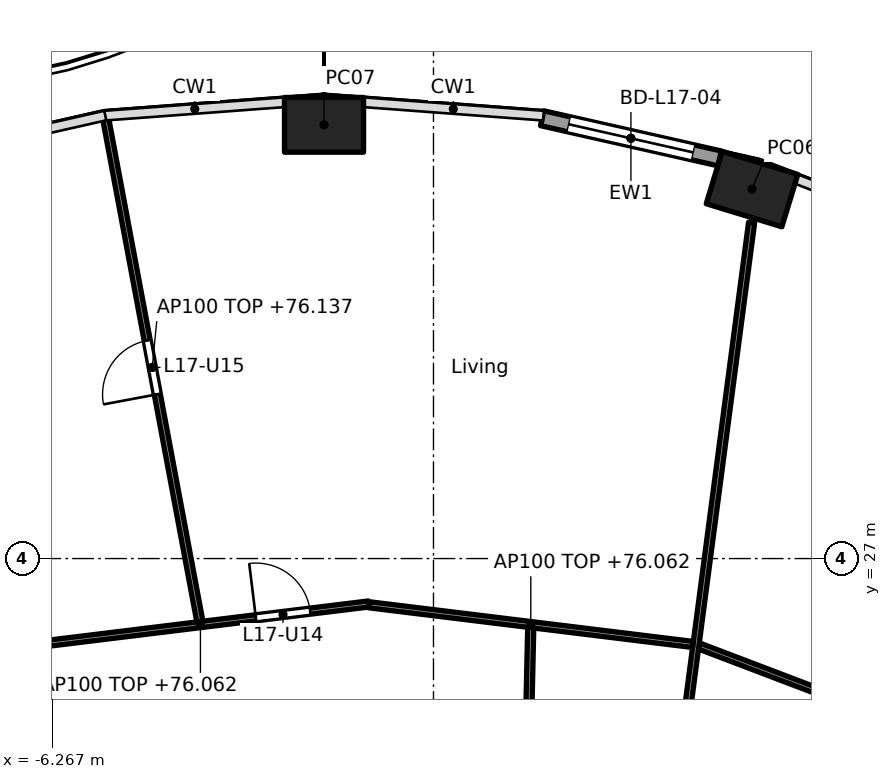
"""IFC4 building model, lengths in metres.
Left out: names, types, materials, properties, quantities, classifications, styles, units other than length and angle.
Written with IfcOpenShell. Run it as: python <this file> out.ifc"""

import sys

from ifc_helpers import new_model, si_unit, direction, frame, frame_2d, origin, origin_2d, place, context, subcontext, project, spatial, rectangle, hollow_rectangle, extrude, element, fill, save


model = new_model("IFC4")
c1 = context("Model", 3, precision=1e-05, world=origin(), true_north=direction((0.0, 1.0)))
c2 = subcontext(c1, "Body", "Model", "MODEL_VIEW")
j1 = project(units=[si_unit("LENGTHUNIT", "METRE"), si_unit("PLANEANGLEUNIT", "RADIAN")], contexts=[c1])
p1 = place(None, origin())
s1 = spatial("IfcSite", under=j1, at=p1, CompositionType="ELEMENT")
p2 = place(p1, origin())
s2 = spatial("IfcBuilding", under=s1, at=p2, CompositionType="ELEMENT")
p3 = place(p2, frame((0.0, 0.0, 73.3)))
s3 = spatial("IfcBuildingStorey", under=s2, at=p3, CompositionType="ELEMENT", Elevation=73.3)
for number, where, z_axis, x_axis in (
    (1, (5.239, 33.076, -0.26), (0.0, 0.0, 1.0), (-0.957, 0.292, 0.0)),
    (2, (-1.8, 34.133, -0.26), (0.0, 0.0, 1.0), (-1.0, 0.0, 0.0)),
):
    element("IfcColumn", number, at=place(p3, frame(where, z_axis=z_axis, x_axis=x_axis)), inside=s3, PredefinedType="COLUMN", context=c2, shape_type="SweptSolid", body=[
        extrude(hollow_rectangle(XDim=1.3, YDim=0.9, WallThickness=0.045, at=origin_2d()), origin(), (0.0, 0.0, 1.0), 3.96),
    ])
p4 = place(p3, frame((1.787, 34.241, 0.0), z_axis=(0.0, 0.0, 1.0), x_axis=(0.975317607872, -0.220806620767, 0.0)))
e3 = element("IfcWall", 3, at=p4, inside=s3, PredefinedType="SOLIDWALL", context=c2, shape_type="SweptSolid", body=[
    extrude(rectangle(XDim=2.993, YDim=0.25, at=frame_2d((1.497, 0.0))), origin(), (0.0, 0.0, 1.0), 3.44),
])
p5 = place(p4, frame((0.447, 0.0, 0.0)))
e4 = element("IfcOpeningElement", 4, at=p5, cuts=e3, PredefinedType="OPENING", context=c2, shape_type="SweptSolid", body=[
    extrude(rectangle(XDim=2.1, YDim=2.4, at=frame_2d((1.05, 1.2))), frame((0.0, 0.135, 0.0), z_axis=(0.0, -1.0, 0.0), x_axis=(1.0, 0.0, 0.0)), (0.0, 0.0, 1.0), 0.27),
])
p6 = place(p3, frame((6.141, 14.829, 0.0), z_axis=(0.0, 0.0, 1.0), x_axis=(0.354477134193, 0.935064682968, 0.0)))
e5 = element("IfcWall", 5, at=p6, inside=s3, PredefinedType="PARTITIONING", context=c2, shape_type="SweptSolid", body=[
    extrude(rectangle(XDim=15.626, YDim=0.1, at=frame_2d((7.813, 0.0))), origin(), (0.0, 0.0, 1.0), 2.762),
])
p7 = place(p6, frame((1.35, 0.0, 0.0)))
e6 = element("IfcOpeningElement", 6, at=p7, cuts=e5, PredefinedType="OPENING", context=c2, shape_type="SweptSolid", body=[
    extrude(rectangle(XDim=0.9, YDim=2.1, at=frame_2d((0.45, 1.05))), frame((0.0, 0.06, 0.0), z_axis=(0.0, -1.0, 0.0), x_axis=(1.0, 0.0, 0.0)), (0.0, 0.0, 1.0), 0.12),
])
p8 = place(p6, frame((5.606, 0.0, 0.0)))
e7 = element("IfcOpeningElement", 7, at=p8, cuts=e5, PredefinedType="OPENING", context=c2, shape_type="SweptSolid", body=[
    extrude(rectangle(XDim=0.9, YDim=2.1, at=frame_2d((0.45, 1.05))), frame((0.0, 0.06, 0.0), z_axis=(0.0, -1.0, 0.0), x_axis=(1.0, 0.0, 0.0)), (0.0, 0.0, 1.0), 0.12),
])
p9 = place(p3, frame((9.426, 23.637, 0.0), z_axis=(0.0, 0.0, 1.0), x_axis=(-0.93461405629, 0.355663557011, 0.0)))
e8 = element("IfcWall", 8, at=p9, inside=s3, PredefinedType="PARTITIONING", context=c2, shape_type="SweptSolid", body=[
    extrude(rectangle(XDim=5.417, YDim=0.1, at=frame_2d((2.708, 0.0))), origin(), (0.0, 0.0, 1.0), 2.762),
])
p10 = place(p9, frame((2.258, 0.0, 0.0)))
e9 = element("IfcOpeningElement", 9, at=p10, cuts=e8, PredefinedType="OPENING", context=c2, shape_type="SweptSolid", body=[
    extrude(rectangle(XDim=0.9, YDim=2.1, at=frame_2d((0.45, 1.05))), frame((0.0, 0.06, 0.0), z_axis=(0.0, -1.0, 0.0), x_axis=(1.0, 0.0, 0.0)), (0.0, 0.0, 1.0), 0.12),
])
p11 = place(p3, frame((2.615, 12.664, 0.0), z_axis=(0.0, 0.0, 1.0), x_axis=(0.130614967904, 0.99143316979, 0.0)))
e10 = element("IfcWall", 10, at=p11, inside=s3, PredefinedType="PARTITIONING", context=c2, shape_type="SweptSolid", body=[
    extrude(rectangle(XDim=20.034, YDim=0.1, at=frame_2d((10.017, 0.0))), origin(), (0.0, 0.0, 1.0), 2.687),
])
p12 = place(p11, frame((2.359, 0.0, 0.0)))
e11 = element("IfcOpeningElement", 11, at=p12, cuts=e10, PredefinedType="OPENING", context=c2, shape_type="SweptSolid", body=[
    extrude(rectangle(XDim=0.9, YDim=2.1, at=frame_2d((0.45, 1.05))), frame((0.0, 0.06, 0.0), z_axis=(0.0, -1.0, 0.0), x_axis=(1.0, 0.0, 0.0)), (0.0, 0.0, 1.0), 0.12),
])
p13 = place(p11, frame((8.873, 0.0, 0.0)))
e12 = element("IfcOpeningElement", 12, at=p13, cuts=e10, PredefinedType="OPENING", context=c2, shape_type="SweptSolid", body=[
    extrude(rectangle(XDim=0.9, YDim=2.1, at=frame_2d((0.45, 1.05))), frame((0.0, 0.06, 0.0), z_axis=(0.0, -1.0, 0.0), x_axis=(1.0, 0.0, 0.0)), (0.0, 0.0, 1.0), 0.12),
])
p14 = place(p3, frame((4.267, 25.587, 0.0), z_axis=(0.0, 0.0, 1.0), x_axis=(-0.992576206119, 0.121624319302, 0.0)))
e13 = element("IfcWall", 13, at=p14, inside=s3, PredefinedType="PARTITIONING", context=c2, shape_type="SweptSolid", body=[
    extrude(rectangle(XDim=5.374, YDim=0.1, at=frame_2d((2.687, 0.0))), origin(), (0.0, 0.0, 1.0), 2.762),
])
p15 = place(p3, frame((1.433, 18.428, 0.0), z_axis=(0.0, 0.0, 1.0), x_axis=(0.022419421812, 0.999748653175, 0.0)))
e14 = element("IfcWall", 14, at=p15, inside=s3, PredefinedType="PARTITIONING", context=c2, shape_type="SweptSolid", body=[
    extrude(rectangle(XDim=7.438, YDim=0.1, at=frame_2d((3.719, 0.0))), origin(), (0.0, 0.0, 1.0), 3.44),
])
p16 = place(p3, frame((-1.066, 26.253, 0.0), z_axis=(0.0, 0.0, 1.0), x_axis=(-0.992574197255, -0.121640712523, 0.0)))
e15 = element("IfcWall", 15, at=p16, inside=s3, PredefinedType="PARTITIONING", context=c2, shape_type="SweptSolid", body=[
    extrude(rectangle(XDim=5.574, YDim=0.1, at=frame_2d((2.787, 0.0))), origin(), (0.0, 0.0, 1.0), 2.762),
])
p17 = place(p16, frame((0.969, 0.0, 0.0)))
e16 = element("IfcOpeningElement", 16, at=p17, cuts=e15, PredefinedType="OPENING", context=c2, shape_type="SweptSolid", body=[
    extrude(rectangle(XDim=0.9, YDim=2.1, at=frame_2d((0.45, 1.05))), frame((0.0, 0.06, 0.0), z_axis=(0.0, -1.0, 0.0), x_axis=(1.0, 0.0, 0.0)), (0.0, 0.0, 1.0), 0.12),
])
p18 = place(p3, frame((-3.842, 25.963, 0.0), z_axis=(0.0, 0.0, 1.0), x_axis=(-0.184068442651, 0.982913428752, 0.0)))
e17 = element("IfcWall", 17, at=p18, inside=s3, PredefinedType="PARTITIONING", context=c2, shape_type="SweptSolid", body=[
    extrude(rectangle(XDim=8.506, YDim=0.1, at=frame_2d((4.253, 0.0))), origin(), (0.0, 0.0, 1.0), 2.837),
])
p19 = place(p18, frame((3.803, 0.0, 0.0)))
e18 = element("IfcOpeningElement", 18, at=p19, cuts=e17, PredefinedType="OPENING", context=c2, shape_type="SweptSolid", body=[
    extrude(rectangle(XDim=0.9, YDim=2.1, at=frame_2d((0.45, 1.05))), frame((0.0, 0.06, 0.0), z_axis=(0.0, -1.0, 0.0), x_axis=(1.0, 0.0, 0.0)), (0.0, 0.0, 1.0), 0.12),
])
p20 = place(p3, frame((-6.072, 17.915, 0.0), z_axis=(0.0, 0.0, 1.0), x_axis=(-0.404139814253, 0.914697223422, 0.0)))
e19 = element("IfcWall", 19, at=p20, inside=s3, PredefinedType="PARTITIONING", context=c2, shape_type="SweptSolid", body=[
    extrude(rectangle(XDim=15.614, YDim=0.1, at=frame_2d((7.807, 0.0))), origin(), (0.0, 0.0, 1.0), 2.837),
])
p21 = place(p20, frame((3.226, 0.0, 0.0)))
e20 = element("IfcOpeningElement", 20, at=p21, cuts=e19, PredefinedType="OPENING", context=c2, shape_type="SweptSolid", body=[
    extrude(rectangle(XDim=0.9, YDim=2.1, at=frame_2d((0.45, 1.05))), frame((0.0, 0.06, 0.0), z_axis=(0.0, -1.0, 0.0), x_axis=(1.0, 0.0, 0.0)), (0.0, 0.0, 1.0), 0.12),
])
p22 = place(p5, origin())
e21 = element("IfcDoor", 21, at=p22, inside=s3, OperationType="SLIDING_TO_LEFT", PredefinedType="DOOR", context=c2, shape_type="SweptSolid", body=[
    extrude(rectangle(XDim=2.1, YDim=2.4, at=frame_2d((1.05, 1.2))), frame((0.0, 0.025, 0.0), z_axis=(0.0, -1.0, 0.0), x_axis=(1.0, 0.0, 0.0)), (0.0, 0.0, 1.0), 0.05),
])
fill(e4, e21)
p23 = place(p17, frame((0.9, 0.0, 0.0), x_axis=(-1.0, 0.0, 0.0)))
e22 = element("IfcDoor", 22, at=p23, inside=s3, OperationType="SINGLE_SWING_LEFT", PredefinedType="DOOR", context=c2, shape_type="SweptSolid", body=[
    extrude(rectangle(XDim=0.9, YDim=2.1, at=frame_2d((0.45, 1.05))), frame((0.0, 0.025, 0.0), z_axis=(0.0, -1.0, 0.0), x_axis=(1.0, 0.0, 0.0)), (0.0, 0.0, 1.0), 0.05),
])
fill(e16, e22)
p24 = place(p19, origin())
e23 = element("IfcDoor", 23, at=p24, inside=s3, OperationType="SINGLE_SWING_LEFT", PredefinedType="DOOR", context=c2, shape_type="SweptSolid", body=[
    extrude(rectangle(XDim=0.9, YDim=2.1, at=frame_2d((0.45, 1.05))), frame((0.0, 0.025, 0.0), z_axis=(0.0, -1.0, 0.0), x_axis=(1.0, 0.0, 0.0)), (0.0, 0.0, 1.0), 0.05),
])
fill(e18, e23)
save(model, sys.argv[1])
